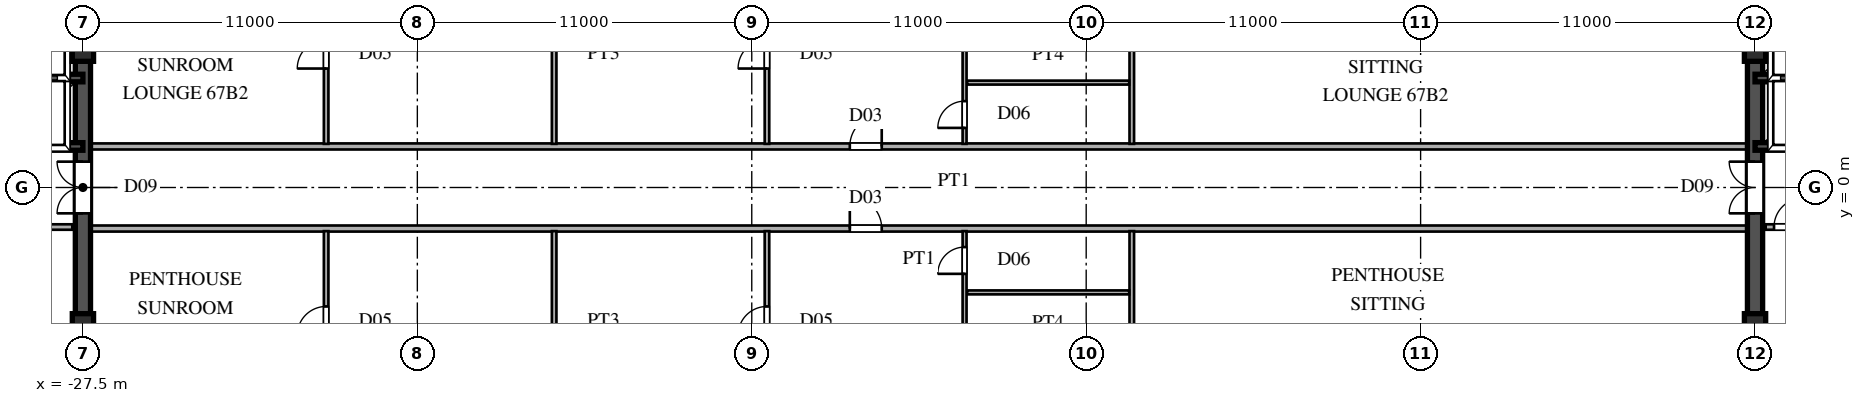
"""IFC4 building model, lengths in metres.
Left out: names, types, materials, properties, quantities, classifications, styles, units other than length and angle.
Written with IfcOpenShell. Run it as: python <this file> out.ifc"""

import sys

from ifc_helpers import new_model, si_unit, direction, frame, frame_2d, origin, origin_2d, place, context, subcontext, project, spatial, rectangle, hollow_rectangle, extrude, source, transform, mapped, element, fill, save


model = new_model("IFC4")
c1 = context("Model", 3, precision=1e-05, world=origin(), true_north=direction((0.0, 1.0)))
c2 = subcontext(c1, "Body", "Model", "MODEL_VIEW")
j1 = project(units=[si_unit("LENGTHUNIT", "METRE"), si_unit("PLANEANGLEUNIT", "RADIAN")], contexts=[c1])
p1 = place(None, origin())
s1 = spatial("IfcSite", under=j1, at=p1, CompositionType="ELEMENT")
p2 = place(p1, origin())
s2 = spatial("IfcBuilding", under=s1, at=p2, CompositionType="ELEMENT")
p3 = place(p2, frame((0.0, 0.0, 254.4)))
s3 = spatial("IfcBuildingStorey", under=s2, at=p3, CompositionType="ELEMENT", Elevation=254.4)
m1 = source(origin(), c2, "Body", "SweptSolid", [
    extrude(hollow_rectangle(XDim=0.7, YDim=0.7, WallThickness=0.03, at=origin_2d()), origin(), (0.0, 0.0, 1.0), 3.75),
])
for number, where, z_axis, x_axis in (
    (1, (-27.5, -4.5, 0.0), (0.0, 0.0, 1.0), (1.0, 0.0, 0.0)),
    (2, (-27.5, 4.5, 0.0), (0.0, 0.0, 1.0), (1.0, 0.0, 0.0)),
    (3, (27.5, -4.5, 0.0), (0.0, 0.0, 1.0), (1.0, 0.0, 0.0)),
    (4, (27.5, 4.5, 0.0), (0.0, 0.0, 1.0), (1.0, 0.0, 0.0)),
):
    element("IfcColumn", number, at=place(p3, frame(where, z_axis=z_axis, x_axis=x_axis)), inside=s3, PredefinedType="COLUMN", context=c2, shape_type="MappedRepresentation", body=[
        mapped(m1, transform((0.0, 0.0, 0.0), scale=1.0)),
    ])
for number, where, z_axis, x_axis in (
    (5, (-27.5, -13.5, 0.0), (0.0, 0.0, 1.0), (0.0, 1.0, 0.0)),
    (6, (-27.5, 1.3, 0.0), (0.0, 0.0, 1.0), (0.0, 1.0, 0.0)),
):
    element("IfcWall", number, at=place(p3, frame(where, z_axis=z_axis, x_axis=x_axis)), inside=s3, PredefinedType="SHEAR", context=c2, shape_type="SweptSolid", body=[
        extrude(rectangle(XDim=12.2, YDim=0.5, at=frame_2d((6.1, 0.0))), origin(), (0.0, 0.0, 1.0), 3.53),
    ])
p4 = place(p3, frame((-27.5, -1.3, 0.0), z_axis=(0.0, 0.0, 1.0), x_axis=(0.0, 1.0, 0.0)))
e7 = element("IfcWall", 7, at=p4, inside=s3, PredefinedType="SHEAR", context=c2, shape_type="SweptSolid", body=[
    extrude(rectangle(XDim=2.6, YDim=0.5, at=frame_2d((1.3, 0.0))), origin(), (0.0, 0.0, 1.0), 3.53),
])
p5 = place(p4, frame((0.45, 0.0, 0.0)))
e8 = element("IfcOpeningElement", 8, at=p5, cuts=e7, PredefinedType="OPENING", context=c2, shape_type="SweptSolid", body=[
    extrude(rectangle(XDim=1.7, YDim=2.35, at=frame_2d((0.85, 1.175))), frame((0.0, 0.26, 0.0), z_axis=(0.0, -1.0, 0.0), x_axis=(1.0, 0.0, 0.0)), (0.0, 0.0, 1.0), 0.52),
])
for number, where, z_axis, x_axis in (
    (9, (-30.3, 1.35, 0.0), (0.0, 0.0, 1.0), (1.0, 0.0, 0.0)),
    (10, (-30.3, 3.6, 0.0), (0.0, 0.0, 1.0), (1.0, 0.0, 0.0)),
):
    element("IfcWall", number, at=place(p3, frame(where, z_axis=z_axis, x_axis=x_axis)), inside=s3, PredefinedType="SHEAR", context=c2, shape_type="SweptSolid", body=[
        extrude(rectangle(XDim=2.8, YDim=0.25, at=frame_2d((1.4, 0.0))), origin(), (0.0, 0.0, 1.0), 3.53),
    ])
p6 = place(p3, frame((-30.3, -1.3, 0.0), z_axis=(0.0, 0.0, 1.0), x_axis=(1.0, 0.0, 0.0)))
e11 = element("IfcWall", 11, at=p6, inside=s3, PredefinedType="PARTITIONING", context=c2, shape_type="SweptSolid", body=[
    extrude(rectangle(XDim=2.45, YDim=0.18, at=frame_2d((1.225, 0.0))), origin(), (0.0, 0.0, 1.0), 3.53),
])
p7 = place(p6, frame((0.275, 0.0, 0.0)))
e12 = element("IfcOpeningElement", 12, at=p7, cuts=e11, PredefinedType="OPENING", context=c2, shape_type="SweptSolid", body=[
    extrude(rectangle(XDim=0.95, YDim=2.15, at=frame_2d((0.475, 1.075))), frame((0.0, 0.1, 0.0), z_axis=(0.0, -1.0, 0.0), x_axis=(1.0, 0.0, 0.0)), (0.0, 0.0, 1.0), 0.2),
])
for number, where, z_axis, x_axis in (
    (13, (27.5, -13.5, 0.0), (0.0, 0.0, 1.0), (0.0, 1.0, 0.0)),
    (14, (27.5, 1.3, 0.0), (0.0, 0.0, 1.0), (0.0, 1.0, 0.0)),
):
    element("IfcWall", number, at=place(p3, frame(where, z_axis=z_axis, x_axis=x_axis)), inside=s3, PredefinedType="SHEAR", context=c2, shape_type="SweptSolid", body=[
        extrude(rectangle(XDim=12.2, YDim=0.5, at=frame_2d((6.1, 0.0))), origin(), (0.0, 0.0, 1.0), 3.53),
    ])
p8 = place(p3, frame((27.5, -1.3, 0.0), z_axis=(0.0, 0.0, 1.0), x_axis=(0.0, 1.0, 0.0)))
e15 = element("IfcWall", 15, at=p8, inside=s3, PredefinedType="SHEAR", context=c2, shape_type="SweptSolid", body=[
    extrude(rectangle(XDim=2.6, YDim=0.5, at=frame_2d((1.3, 0.0))), origin(), (0.0, 0.0, 1.0), 3.53),
])
p9 = place(p8, frame((0.45, 0.0, 0.0)))
e16 = element("IfcOpeningElement", 16, at=p9, cuts=e15, PredefinedType="OPENING", context=c2, shape_type="SweptSolid", body=[
    extrude(rectangle(XDim=1.7, YDim=2.35, at=frame_2d((0.85, 1.175))), frame((0.0, 0.26, 0.0), z_axis=(0.0, -1.0, 0.0), x_axis=(1.0, 0.0, 0.0)), (0.0, 0.0, 1.0), 0.52),
])
for number, where, z_axis, x_axis in (
    (17, (27.5, 1.35, 0.0), (0.0, 0.0, 1.0), (1.0, 0.0, 0.0)),
    (18, (27.5, 3.6, 0.0), (0.0, 0.0, 1.0), (1.0, 0.0, 0.0)),
):
    element("IfcWall", number, at=place(p3, frame(where, z_axis=z_axis, x_axis=x_axis)), inside=s3, PredefinedType="SHEAR", context=c2, shape_type="SweptSolid", body=[
        extrude(rectangle(XDim=2.8, YDim=0.25, at=frame_2d((1.4, 0.0))), origin(), (0.0, 0.0, 1.0), 3.53),
    ])
p10 = place(p3, frame((27.85, -1.3, 0.0), z_axis=(0.0, 0.0, 1.0), x_axis=(1.0, 0.0, 0.0)))
e19 = element("IfcWall", 19, at=p10, inside=s3, PredefinedType="PARTITIONING", context=c2, shape_type="SweptSolid", body=[
    extrude(rectangle(XDim=2.45, YDim=0.18, at=frame_2d((1.225, 0.0))), origin(), (0.0, 0.0, 1.0), 3.53),
])
p11 = place(p10, frame((0.275, 0.0, 0.0)))
e20 = element("IfcOpeningElement", 20, at=p11, cuts=e19, PredefinedType="OPENING", context=c2, shape_type="SweptSolid", body=[
    extrude(rectangle(XDim=0.95, YDim=2.15, at=frame_2d((0.475, 1.075))), frame((0.0, 0.1, 0.0), z_axis=(0.0, -1.0, 0.0), x_axis=(1.0, 0.0, 0.0)), (0.0, 0.0, 1.0), 0.2),
])
p12 = place(p3, frame((1.585, -3.45, 0.0), z_axis=(0.0, 0.0, 1.0), x_axis=(1.0, 0.0, 0.0)))
e21 = element("IfcWall", 21, at=p12, inside=s3, PredefinedType="PARTITIONING", context=c2, shape_type="SweptSolid", body=[
    extrude(rectangle(XDim=5.33, YDim=0.13, at=frame_2d((2.665, 0.0))), origin(), (0.0, 0.0, 1.0), 3.53),
])
p13 = place(p3, frame((-27.245, -1.35, 0.0), z_axis=(0.0, 0.0, 1.0), x_axis=(1.0, 0.0, 0.0)))
e22 = element("IfcWall", 22, at=p13, inside=s3, PredefinedType="PARTITIONING", context=c2, shape_type="SweptSolid", body=[
    extrude(rectangle(XDim=54.49, YDim=0.2, at=frame_2d((27.245, 0.0))), origin(), (0.0, 0.0, 1.0), 3.53),
])
p14 = place(p13, frame((24.97, 0.0, 0.0)))
e23 = element("IfcOpeningElement", 23, at=p14, cuts=e22, PredefinedType="OPENING", context=c2, shape_type="SweptSolid", body=[
    extrude(rectangle(XDim=1.05, YDim=2.25, at=frame_2d((0.525, 1.125))), frame((0.0, 0.11, 0.0), z_axis=(0.0, -1.0, 0.0), x_axis=(1.0, 0.0, 0.0)), (0.0, 0.0, 1.0), 0.22),
])
p15 = place(p3, frame((-27.245, 1.35, 0.0), z_axis=(0.0, 0.0, 1.0), x_axis=(1.0, 0.0, 0.0)))
e24 = element("IfcWall", 24, at=p15, inside=s3, PredefinedType="PARTITIONING", context=c2, shape_type="SweptSolid", body=[
    extrude(rectangle(XDim=54.49, YDim=0.2, at=frame_2d((27.245, 0.0))), origin(), (0.0, 0.0, 1.0), 3.53),
])
p16 = place(p15, frame((24.97, 0.0, 0.0)))
e25 = element("IfcOpeningElement", 25, at=p16, cuts=e24, PredefinedType="OPENING", context=c2, shape_type="SweptSolid", body=[
    extrude(rectangle(XDim=1.05, YDim=2.25, at=frame_2d((0.525, 1.125))), frame((0.0, 0.11, 0.0), z_axis=(0.0, -1.0, 0.0), x_axis=(1.0, 0.0, 0.0)), (0.0, 0.0, 1.0), 0.22),
])
p17 = place(p3, frame((1.585, 3.45, 0.0), z_axis=(0.0, 0.0, 1.0), x_axis=(1.0, 0.0, 0.0)))
e26 = element("IfcWall", 26, at=p17, inside=s3, PredefinedType="PARTITIONING", context=c2, shape_type="SweptSolid", body=[
    extrude(rectangle(XDim=5.33, YDim=0.13, at=frame_2d((2.665, 0.0))), origin(), (0.0, 0.0, 1.0), 3.53),
])
p18 = place(p3, frame((-19.5, -13.5, 0.0), z_axis=(0.0, 0.0, 1.0), x_axis=(0.0, 1.0, 0.0)))
e27 = element("IfcWall", 27, at=p18, inside=s3, PredefinedType="PARTITIONING", context=c2, shape_type="SweptSolid", body=[
    extrude(rectangle(XDim=12.065, YDim=0.15, at=frame_2d((6.032, 0.0))), origin(), (0.0, 0.0, 1.0), 3.53),
])
p19 = place(p18, frame((8.637, 0.0, 0.0)))
e28 = element("IfcOpeningElement", 28, at=p19, cuts=e27, PredefinedType="OPENING", context=c2, shape_type="SweptSolid", body=[
    extrude(rectangle(XDim=0.95, YDim=2.15, at=frame_2d((0.475, 1.075))), frame((0.0, 0.085, 0.0), z_axis=(0.0, -1.0, 0.0), x_axis=(1.0, 0.0, 0.0)), (0.0, 0.0, 1.0), 0.17),
])
p20 = place(p3, frame((-19.5, 1.435, 0.0), z_axis=(0.0, 0.0, 1.0), x_axis=(0.0, 1.0, 0.0)))
e29 = element("IfcWall", 29, at=p20, inside=s3, PredefinedType="PARTITIONING", context=c2, shape_type="SweptSolid", body=[
    extrude(rectangle(XDim=12.065, YDim=0.15, at=frame_2d((6.032, 0.0))), origin(), (0.0, 0.0, 1.0), 3.53),
])
p21 = place(p20, frame((2.478, 0.0, 0.0)))
e30 = element("IfcOpeningElement", 30, at=p21, cuts=e29, PredefinedType="OPENING", context=c2, shape_type="SweptSolid", body=[
    extrude(rectangle(XDim=0.95, YDim=2.15, at=frame_2d((0.475, 1.075))), frame((0.0, 0.085, 0.0), z_axis=(0.0, -1.0, 0.0), x_axis=(1.0, 0.0, 0.0)), (0.0, 0.0, 1.0), 0.17),
])
for number, where, z_axis, x_axis in (
    (31, (-12.0, -7.34, 0.0), (0.0, 0.0, 1.0), (0.0, 1.0, 0.0)),
    (32, (-12.0, 1.435, 0.0), (0.0, 0.0, 1.0), (0.0, 1.0, 0.0)),
):
    element("IfcWall", number, at=place(p3, frame(where, z_axis=z_axis, x_axis=x_axis)), inside=s3, PredefinedType="PARTITIONING", context=c2, shape_type="SweptSolid", body=[
        extrude(rectangle(XDim=5.905, YDim=0.15, at=frame_2d((2.953, 0.0))), origin(), (0.0, 0.0, 1.0), 3.53),
    ])
p22 = place(p3, frame((-5.0, -13.39, 0.0), z_axis=(0.0, 0.0, 1.0), x_axis=(0.0, 1.0, 0.0)))
e33 = element("IfcWall", 33, at=p22, inside=s3, PredefinedType="PARTITIONING", context=c2, shape_type="SweptSolid", body=[
    extrude(rectangle(XDim=11.955, YDim=0.15, at=frame_2d((5.978, 0.0))), origin(), (0.0, 0.0, 1.0), 3.53),
])
p23 = place(p22, frame((8.528, 0.0, 0.0)))
e34 = element("IfcOpeningElement", 34, at=p23, cuts=e33, PredefinedType="OPENING", context=c2, shape_type="SweptSolid", body=[
    extrude(rectangle(XDim=0.95, YDim=2.15, at=frame_2d((0.475, 1.075))), frame((0.0, 0.085, 0.0), z_axis=(0.0, -1.0, 0.0), x_axis=(1.0, 0.0, 0.0)), (0.0, 0.0, 1.0), 0.17),
])
p24 = place(p22, frame((2.452, 0.0, 0.0)))
e35 = element("IfcOpeningElement", 35, at=p24, cuts=e33, PredefinedType="OPENING", context=c2, shape_type="SweptSolid", body=[
    extrude(rectangle(XDim=0.95, YDim=2.15, at=frame_2d((0.475, 1.075))), frame((0.0, 0.085, 0.0), z_axis=(0.0, -1.0, 0.0), x_axis=(1.0, 0.0, 0.0)), (0.0, 0.0, 1.0), 0.17),
])
p25 = place(p3, frame((-5.0, 1.435, 0.0), z_axis=(0.0, 0.0, 1.0), x_axis=(0.0, 1.0, 0.0)))
e36 = element("IfcWall", 36, at=p25, inside=s3, PredefinedType="PARTITIONING", context=c2, shape_type="SweptSolid", body=[
    extrude(rectangle(XDim=11.955, YDim=0.15, at=frame_2d((5.978, 0.0))), origin(), (0.0, 0.0, 1.0), 3.53),
])
p26 = place(p25, frame((2.478, 0.0, 0.0)))
e37 = element("IfcOpeningElement", 37, at=p26, cuts=e36, PredefinedType="OPENING", context=c2, shape_type="SweptSolid", body=[
    extrude(rectangle(XDim=0.95, YDim=2.15, at=frame_2d((0.475, 1.075))), frame((0.0, 0.085, 0.0), z_axis=(0.0, -1.0, 0.0), x_axis=(1.0, 0.0, 0.0)), (0.0, 0.0, 1.0), 0.17),
])
p27 = place(p25, frame((8.552, 0.0, 0.0)))
e38 = element("IfcOpeningElement", 38, at=p27, cuts=e36, PredefinedType="OPENING", context=c2, shape_type="SweptSolid", body=[
    extrude(rectangle(XDim=0.95, YDim=2.15, at=frame_2d((0.475, 1.075))), frame((0.0, 0.085, 0.0), z_axis=(0.0, -1.0, 0.0), x_axis=(1.0, 0.0, 0.0)), (0.0, 0.0, 1.0), 0.17),
])
p28 = place(p3, frame((1.5, -13.5, 0.0), z_axis=(0.0, 0.0, 1.0), x_axis=(0.0, 1.0, 0.0)))
e39 = element("IfcWall", 39, at=p28, inside=s3, PredefinedType="PARTITIONING", context=c2, shape_type="SweptSolid", body=[
    extrude(rectangle(XDim=12.065, YDim=0.13, at=frame_2d((6.032, 0.0))), origin(), (0.0, 0.0, 1.0), 3.53),
])
p29 = place(p28, frame((10.66, 0.0, 0.0)))
e40 = element("IfcOpeningElement", 40, at=p29, cuts=e39, PredefinedType="OPENING", context=c2, shape_type="SweptSolid", body=[
    extrude(rectangle(XDim=0.88, YDim=2.1, at=frame_2d((0.44, 1.05))), frame((0.0, 0.075, 0.0), z_axis=(0.0, -1.0, 0.0), x_axis=(1.0, 0.0, 0.0)), (0.0, 0.0, 1.0), 0.15),
])
p30 = place(p28, frame((4.55, 0.0, 0.0)))
e41 = element("IfcOpeningElement", 41, at=p30, cuts=e39, PredefinedType="OPENING", context=c2, shape_type="SweptSolid", body=[
    extrude(rectangle(XDim=0.95, YDim=2.15, at=frame_2d((0.475, 1.075))), frame((0.0, 0.075, 0.0), z_axis=(0.0, -1.0, 0.0), x_axis=(1.0, 0.0, 0.0)), (0.0, 0.0, 1.0), 0.15),
])
p31 = place(p3, frame((1.5, 1.435, 0.0), z_axis=(0.0, 0.0, 1.0), x_axis=(0.0, 1.0, 0.0)))
e42 = element("IfcWall", 42, at=p31, inside=s3, PredefinedType="PARTITIONING", context=c2, shape_type="SweptSolid", body=[
    extrude(rectangle(XDim=12.065, YDim=0.13, at=frame_2d((6.032, 0.0))), origin(), (0.0, 0.0, 1.0), 3.53),
])
p32 = place(p31, frame((0.525, 0.0, 0.0)))
e43 = element("IfcOpeningElement", 43, at=p32, cuts=e42, PredefinedType="OPENING", context=c2, shape_type="SweptSolid", body=[
    extrude(rectangle(XDim=0.88, YDim=2.1, at=frame_2d((0.44, 1.05))), frame((0.0, 0.075, 0.0), z_axis=(0.0, -1.0, 0.0), x_axis=(1.0, 0.0, 0.0)), (0.0, 0.0, 1.0), 0.15),
])
p33 = place(p31, frame((6.565, 0.0, 0.0)))
e44 = element("IfcOpeningElement", 44, at=p33, cuts=e42, PredefinedType="OPENING", context=c2, shape_type="SweptSolid", body=[
    extrude(rectangle(XDim=0.95, YDim=2.15, at=frame_2d((0.475, 1.075))), frame((0.0, 0.075, 0.0), z_axis=(0.0, -1.0, 0.0), x_axis=(1.0, 0.0, 0.0)), (0.0, 0.0, 1.0), 0.15),
])
p34 = place(p3, frame((7.0, -13.5, 0.0), z_axis=(0.0, 0.0, 1.0), x_axis=(0.0, 1.0, 0.0)))
e45 = element("IfcWall", 45, at=p34, inside=s3, PredefinedType="PARTITIONING", context=c2, shape_type="SweptSolid", body=[
    extrude(rectangle(XDim=12.065, YDim=0.15, at=frame_2d((6.032, 0.0))), origin(), (0.0, 0.0, 1.0), 3.53),
])
p35 = place(p34, frame((7.587, 0.0, 0.0)))
e46 = element("IfcOpeningElement", 46, at=p35, cuts=e45, PredefinedType="OPENING", context=c2, shape_type="SweptSolid", body=[
    extrude(rectangle(XDim=0.95, YDim=2.15, at=frame_2d((0.475, 1.075))), frame((0.0, 0.085, 0.0), z_axis=(0.0, -1.0, 0.0), x_axis=(1.0, 0.0, 0.0)), (0.0, 0.0, 1.0), 0.17),
])
p36 = place(p3, frame((7.0, 1.435, 0.0), z_axis=(0.0, 0.0, 1.0), x_axis=(0.0, 1.0, 0.0)))
e47 = element("IfcWall", 47, at=p36, inside=s3, PredefinedType="PARTITIONING", context=c2, shape_type="SweptSolid", body=[
    extrude(rectangle(XDim=12.065, YDim=0.15, at=frame_2d((6.032, 0.0))), origin(), (0.0, 0.0, 1.0), 3.53),
])
p37 = place(p36, frame((3.528, 0.0, 0.0)))
e48 = element("IfcOpeningElement", 48, at=p37, cuts=e47, PredefinedType="OPENING", context=c2, shape_type="SweptSolid", body=[
    extrude(rectangle(XDim=0.95, YDim=2.15, at=frame_2d((0.475, 1.075))), frame((0.0, 0.085, 0.0), z_axis=(0.0, -1.0, 0.0), x_axis=(1.0, 0.0, 0.0)), (0.0, 0.0, 1.0), 0.17),
])
m2 = source(origin(), c2, "Body", "SweptSolid", [
    extrude(rectangle(XDim=1.7, YDim=2.35, at=frame_2d((0.85, 1.175))), frame((0.0, 0.025, 0.0), z_axis=(0.0, -1.0, 0.0), x_axis=(1.0, 0.0, 0.0)), (0.0, 0.0, 1.0), 0.05),
])
p38 = place(p5, origin())
e49 = element("IfcDoor", 49, at=p38, inside=s3, OperationType="DOUBLE_SWING_LEFT", PredefinedType="DOOR", context=c2, shape_type="MappedRepresentation", body=[
    mapped(m2, transform((0.0, 0.0, 0.0), scale=1.0)),
])
fill(e8, e49)
p39 = place(p9, origin())
e50 = element("IfcDoor", 50, at=p39, inside=s3, OperationType="DOUBLE_SWING_LEFT", PredefinedType="DOOR", context=c2, shape_type="MappedRepresentation", body=[
    mapped(m2, transform((0.0, 0.0, 0.0), scale=1.0)),
])
fill(e16, e50)
m3 = source(origin(), c2, "Body", "SweptSolid", [
    extrude(rectangle(XDim=0.95, YDim=2.15, at=frame_2d((0.475, 1.075))), frame((0.0, 0.025, 0.0), z_axis=(0.0, -1.0, 0.0), x_axis=(1.0, 0.0, 0.0)), (0.0, 0.0, 1.0), 0.05),
])
p40 = place(p11, origin())
e51 = element("IfcDoor", 51, at=p40, inside=s3, OperationType="SINGLE_SWING_RIGHT", PredefinedType="DOOR", context=c2, shape_type="MappedRepresentation", body=[
    mapped(m3, transform((0.0, 0.0, 0.0), scale=1.0)),
])
fill(e20, e51)
m4 = source(origin(), c2, "Body", "SweptSolid", [
    extrude(rectangle(XDim=1.05, YDim=2.25, at=frame_2d((0.525, 1.125))), frame((0.0, 0.025, 0.0), z_axis=(0.0, -1.0, 0.0), x_axis=(1.0, 0.0, 0.0)), (0.0, 0.0, 1.0), 0.05),
])
p41 = place(p14, origin())
e52 = element("IfcDoor", 52, at=p41, inside=s3, OperationType="SINGLE_SWING_LEFT", PredefinedType="DOOR", context=c2, shape_type="MappedRepresentation", body=[
    mapped(m4, transform((0.0, 0.0, 0.0), scale=1.0)),
])
fill(e23, e52)
p42 = place(p16, origin())
e53 = element("IfcDoor", 53, at=p42, inside=s3, OperationType="SINGLE_SWING_RIGHT", PredefinedType="DOOR", context=c2, shape_type="MappedRepresentation", body=[
    mapped(m4, transform((0.0, 0.0, 0.0), scale=1.0)),
])
fill(e25, e53)
m5 = source(origin(), c2, "Body", "SweptSolid", [
    extrude(rectangle(XDim=0.95, YDim=2.15, at=frame_2d((0.475, 1.075))), frame((0.0, 0.025, 0.0), z_axis=(0.0, -1.0, 0.0), x_axis=(1.0, 0.0, 0.0)), (0.0, 0.0, 1.0), 0.05),
])
p43 = place(p19, origin())
e54 = element("IfcDoor", 54, at=p43, inside=s3, OperationType="SINGLE_SWING_LEFT", PredefinedType="DOOR", context=c2, shape_type="MappedRepresentation", body=[
    mapped(m5, transform((0.0, 0.0, 0.0), scale=1.0)),
])
fill(e28, e54)
p44 = place(p21, origin())
e55 = element("IfcDoor", 55, at=p44, inside=s3, OperationType="SINGLE_SWING_LEFT", PredefinedType="DOOR", context=c2, shape_type="MappedRepresentation", body=[
    mapped(m5, transform((0.0, 0.0, 0.0), scale=1.0)),
])
fill(e30, e55)
p45 = place(p23, origin())
e56 = element("IfcDoor", 56, at=p45, inside=s3, OperationType="SINGLE_SWING_LEFT", PredefinedType="DOOR", context=c2, shape_type="MappedRepresentation", body=[
    mapped(m5, transform((0.0, 0.0, 0.0), scale=1.0)),
])
fill(e34, e56)
p46 = place(p26, origin())
e57 = element("IfcDoor", 57, at=p46, inside=s3, OperationType="SINGLE_SWING_LEFT", PredefinedType="DOOR", context=c2, shape_type="MappedRepresentation", body=[
    mapped(m5, transform((0.0, 0.0, 0.0), scale=1.0)),
])
fill(e37, e57)
m6 = source(origin(), c2, "Body", "SweptSolid", [
    extrude(rectangle(XDim=0.88, YDim=2.1, at=frame_2d((0.44, 1.05))), frame((0.0, 0.025, 0.0), z_axis=(0.0, -1.0, 0.0), x_axis=(1.0, 0.0, 0.0)), (0.0, 0.0, 1.0), 0.05),
])
p47 = place(p29, origin())
e58 = element("IfcDoor", 58, at=p47, inside=s3, OperationType="SINGLE_SWING_LEFT", PredefinedType="DOOR", context=c2, shape_type="MappedRepresentation", body=[
    mapped(m6, transform((0.0, 0.0, 0.0), scale=1.0)),
])
fill(e40, e58)
p48 = place(p32, origin())
e59 = element("IfcDoor", 59, at=p48, inside=s3, OperationType="SINGLE_SWING_LEFT", PredefinedType="DOOR", context=c2, shape_type="MappedRepresentation", body=[
    mapped(m6, transform((0.0, 0.0, 0.0), scale=1.0)),
])
fill(e43, e59)
save(model, sys.argv[1])
